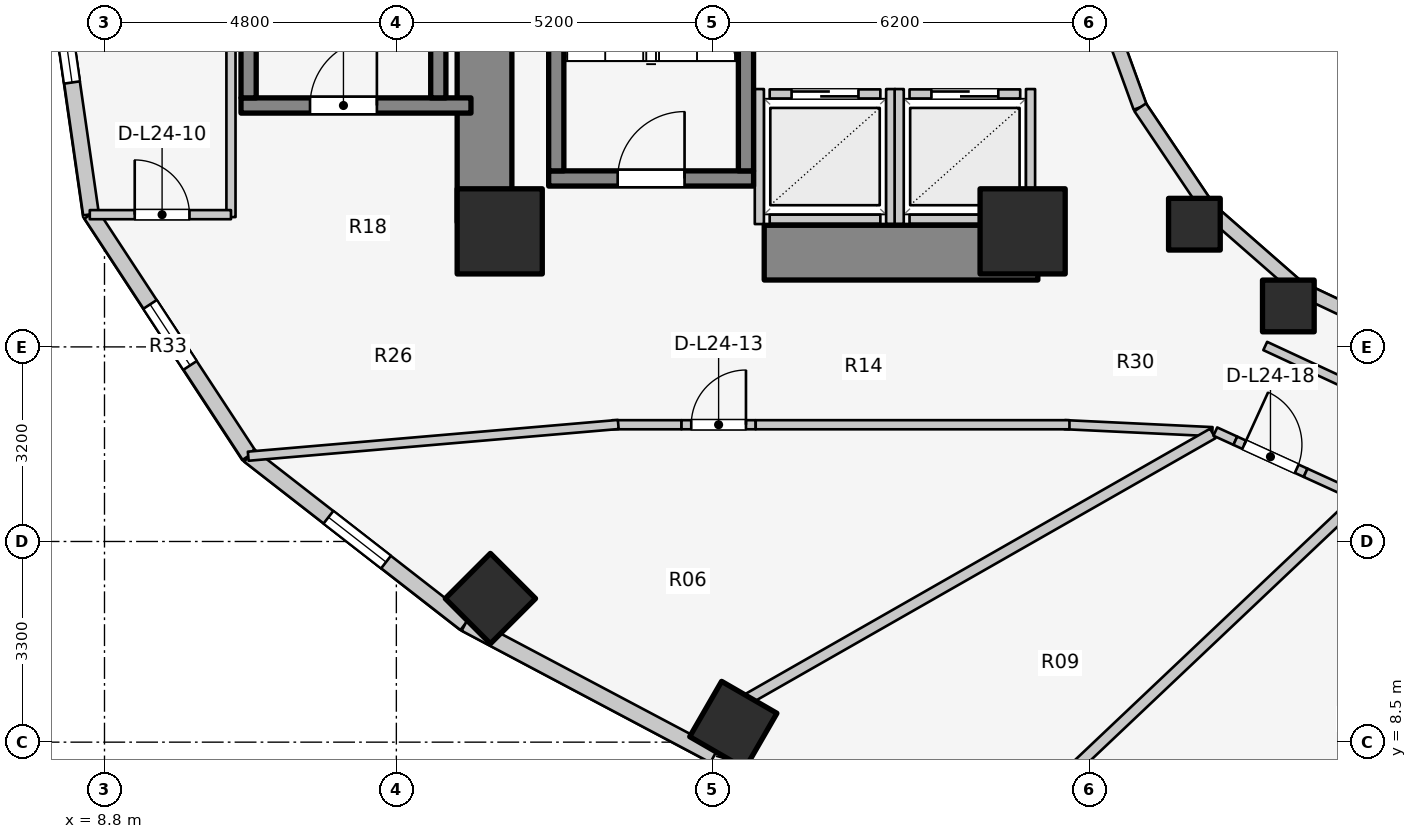
"""IFC4 building model, lengths in metres.
Left out: names, types, materials, properties, quantities, classifications, styles, units other than length and angle.
Written with IfcOpenShell. Run it as: python <this file> out.ifc"""

import sys

from ifc_helpers import new_model, si_unit, direction, frame, frame_2d, origin, origin_2d, place, context, subcontext, project, spatial, rectangle, extrude, element, fill, save


model = new_model("IFC4")
c1 = context("Model", 3, precision=1e-05, world=origin(), true_north=direction((0.0, 1.0)))
c2 = subcontext(c1, "Body", "Model", "MODEL_VIEW")
j1 = project(units=[si_unit("LENGTHUNIT", "METRE"), si_unit("PLANEANGLEUNIT", "RADIAN")], contexts=[c1])
p1 = place(None, origin())
s1 = spatial("IfcSite", under=j1, at=p1, CompositionType="ELEMENT")
p2 = place(p1, origin())
s2 = spatial("IfcBuilding", under=s1, at=p2, CompositionType="ELEMENT")
p3 = place(p2, frame((0.0, 0.0, 82.5)))
s3 = spatial("IfcBuildingStorey", under=s2, at=p3, CompositionType="ELEMENT", Elevation=82.5)
p4 = place(p3, frame((15.05, 17.05, 0.0), z_axis=(0.0, 0.0, 1.0), x_axis=(0.0, 1.0, 0.0)))
e1 = element("IfcWall", 1, at=p4, inside=s3, PredefinedType="SHEAR", context=c2, shape_type="SweptSolid", body=[
    extrude(rectangle(XDim=12.8, YDim=0.9, at=frame_2d((6.4, 0.0))), origin(), (0.0, 0.0, 1.0), 3.1),
])
p5 = place(p3, frame((19.65, 16.55, 0.0), z_axis=(0.0, 0.0, 1.0), x_axis=(1.0, 0.0, 0.0)))
e2 = element("IfcWall", 2, at=p5, inside=s3, PredefinedType="SHEAR", context=c2, shape_type="SweptSolid", body=[
    extrude(rectangle(XDim=4.5, YDim=0.9, at=frame_2d((2.25, 0.0))), origin(), (0.0, 0.0, 1.0), 3.1),
])
p6 = place(p3, frame((16.105, 17.77, 0.0), z_axis=(0.0, 0.0, 1.0), x_axis=(1.0, 0.0, 0.0)))
e3 = element("IfcWall", 3, at=p6, inside=s3, PredefinedType="SOLIDWALL", context=c2, shape_type="SweptSolid", body=[
    extrude(rectangle(XDim=3.37, YDim=0.25, at=frame_2d((1.685, 0.0))), origin(), (0.0, 0.0, 1.0), 3.1),
])
p7 = place(p6, frame((1.135, 0.0, 0.0)))
e4 = element("IfcOpeningElement", 4, at=p7, cuts=e3, PredefinedType="OPENING", context=c2, shape_type="SweptSolid", body=[
    extrude(rectangle(XDim=1.1, YDim=2.1, at=frame_2d((0.55, 1.05))), frame((0.0, 0.135, 0.0), z_axis=(0.0, -1.0, 0.0), x_axis=(1.0, 0.0, 0.0)), (0.0, 0.0, 1.0), 0.27),
])
for number, where, z_axis, x_axis in (
    (5, (16.23, 17.895, 0.0), (0.0, 0.0, 1.0), (0.0, 1.0, 0.0)),
    (6, (19.35, 17.895, 0.0), (0.0, 0.0, 1.0), (0.0, 1.0, 0.0)),
):
    element("IfcWall", number, at=place(p3, frame(where, z_axis=z_axis, x_axis=x_axis)), inside=s3, PredefinedType="SOLIDWALL", context=c2, shape_type="SweptSolid", body=[
        extrude(rectangle(XDim=7.81, YDim=0.25, at=frame_2d((3.905, 0.0))), origin(), (0.0, 0.0, 1.0), 3.1),
    ])
p8 = place(p3, frame((11.045, 18.97, 0.0), z_axis=(0.0, 0.0, 1.0), x_axis=(1.0, 0.0, 0.0)))
e7 = element("IfcWall", 7, at=p8, inside=s3, PredefinedType="SOLIDWALL", context=c2, shape_type="SweptSolid", body=[
    extrude(rectangle(XDim=3.782, YDim=0.25, at=frame_2d((1.891, 0.0))), origin(), (0.0, 0.0, 1.0), 3.1),
])
p9 = place(p8, frame((1.135, 0.0, 0.0)))
e8 = element("IfcOpeningElement", 8, at=p9, cuts=e7, PredefinedType="OPENING", context=c2, shape_type="SweptSolid", body=[
    extrude(rectangle(XDim=1.1, YDim=2.1, at=frame_2d((0.55, 1.05))), frame((0.0, 0.135, 0.0), z_axis=(0.0, -1.0, 0.0), x_axis=(1.0, 0.0, 0.0)), (0.0, 0.0, 1.0), 0.27),
])
for number, where, z_axis, x_axis in (
    (9, (11.17, 19.095, 0.0), (0.0, 0.0, 1.0), (0.0, 1.0, 0.0)),
    (10, (14.29, 19.095, 0.0), (0.0, 0.0, 1.0), (0.0, 1.0, 0.0)),
):
    element("IfcWall", number, at=place(p3, frame(where, z_axis=z_axis, x_axis=x_axis)), inside=s3, PredefinedType="SOLIDWALL", context=c2, shape_type="SweptSolid", body=[
        extrude(rectangle(XDim=7.81, YDim=0.25, at=frame_2d((3.905, 0.0))), origin(), (0.0, 0.0, 1.0), 3.1),
    ])
for number, where, z_axis, x_axis in (
    (11, (15.3, 16.9, 0.0), (0.0, 0.0, 1.0), (1.0, 0.0, 0.0)),
    (12, (23.9, 16.9, 0.0), (0.0, 0.0, 1.0), (1.0, 0.0, 0.0)),
):
    element("IfcColumn", number, at=place(p3, frame(where, z_axis=z_axis, x_axis=x_axis)), inside=s3, PredefinedType="COLUMN", context=c2, shape_type="SweptSolid", body=[
        extrude(rectangle(XDim=1.4, YDim=1.4, at=origin_2d()), origin(), (0.0, 0.0, 1.0), 3.1),
    ])
p10 = place(p3, frame((26.725, 17.018, 0.0), z_axis=(0.0, 0.0, 1.0), x_axis=(1.0, 0.0, 0.0)))
e13 = element("IfcColumn", 13, at=p10, inside=s3, PredefinedType="COLUMN", context=c2, shape_type="SweptSolid", body=[
    extrude(rectangle(XDim=0.85, YDim=0.85, at=origin_2d()), origin(), (0.0, 0.0, 1.0), 3.1),
])
p11 = place(p3, frame((15.147, 10.862, 0.0), z_axis=(0.0, 0.0, 1.0), x_axis=(-0.707106781187, -0.707106781187, 0.0)))
e14 = element("IfcColumn", 14, at=p11, inside=s3, PredefinedType="COLUMN", context=c2, shape_type="SweptSolid", body=[
    extrude(rectangle(XDim=1.05, YDim=1.05, at=origin_2d()), origin(), (0.0, 0.0, 1.0), 3.1),
])
p12 = place(p3, frame((28.27, 15.673, 0.0), z_axis=(0.0, 0.0, 1.0), x_axis=(1.0, 0.0, 0.0)))
e15 = element("IfcColumn", 15, at=p12, inside=s3, PredefinedType="COLUMN", context=c2, shape_type="SweptSolid", body=[
    extrude(rectangle(XDim=0.85, YDim=0.85, at=origin_2d()), origin(), (0.0, 0.0, 1.0), 3.1),
])
p13 = place(p3, frame((19.142, 8.782, 0.0), z_axis=(0.0, 0.0, 1.0), x_axis=(-0.5, -0.866025403784, 0.0)))
e16 = element("IfcColumn", 16, at=p13, inside=s3, PredefinedType="COLUMN", context=c2, shape_type="SweptSolid", body=[
    extrude(rectangle(XDim=1.05, YDim=1.05, at=origin_2d()), origin(), (0.0, 0.0, 1.0), 3.1),
])
p14 = place(p3, frame((25.123, 20.898, 0.0), z_axis=(0.0, 0.0, 1.0), x_axis=(0.341423187295, -0.93990968033, 0.0)))
e17 = element("IfcWall", 17, at=p14, inside=s3, PredefinedType="STANDARD", context=c2, shape_type="SweptSolid", body=[
    extrude(rectangle(XDim=2.084, YDim=0.23, at=frame_2d((1.042, 0.0))), origin(), (0.0, 0.0, 1.0), 2.56),
])
p15 = place(p3, frame((25.834, 18.94, 0.0), z_axis=(0.0, 0.0, 1.0), x_axis=(0.558197800898, -0.829707909492, 0.0)))
e18 = element("IfcWall", 18, at=p15, inside=s3, PredefinedType="STANDARD", context=c2, shape_type="SweptSolid", body=[
    extrude(rectangle(XDim=2.027, YDim=0.23, at=frame_2d((1.013, 0.0))), origin(), (0.0, 0.0, 1.0), 1.22),
])
p16 = place(p3, frame((26.965, 17.258, 0.0), z_axis=(0.0, 0.0, 1.0), x_axis=(0.752576694707, -0.658504607869, 0.0)))
e19 = element("IfcWall", 19, at=p16, inside=s3, PredefinedType="STANDARD", context=c2, shape_type="SweptSolid", body=[
    extrude(rectangle(XDim=1.959, YDim=0.23, at=frame_2d((0.98, 0.0))), origin(), (0.0, 0.0, 1.0), 1.22),
])
p17 = place(p3, frame((28.44, 15.968, 0.0), z_axis=(0.0, 0.0, 1.0), x_axis=(0.904179699603, -0.427152280606, 0.0)))
e20 = element("IfcWall", 20, at=p17, inside=s3, PredefinedType="STANDARD", context=c2, shape_type="SweptSolid", body=[
    extrude(rectangle(XDim=1.899, YDim=0.23, at=frame_2d((0.95, 0.0))), origin(), (0.0, 0.0, 1.0), 1.22),
])
p18 = place(p3, frame((7.74, 23.0, 0.0), z_axis=(0.0, 0.0, 1.0), x_axis=(0.142572472068, -0.98978436551, 0.0)))
e21 = element("IfcWall", 21, at=p18, inside=s3, PredefinedType="STANDARD", context=c2, shape_type="SweptSolid", body=[
    extrude(rectangle(XDim=5.879, YDim=0.26, at=frame_2d((2.939, 0.0))), origin(), (0.0, 0.0, 1.0), 2.57),
])
p19 = place(p18, frame((2.189, 0.0, 0.75)))
e22 = element("IfcOpeningElement", 22, at=p19, cuts=e21, PredefinedType="OPENING", context=c2, shape_type="SweptSolid", body=[
    extrude(rectangle(XDim=1.5, YDim=1.6, at=frame_2d((0.75, 0.8))), frame((0.0, 0.14, 0.0), z_axis=(0.0, -1.0, 0.0), x_axis=(1.0, 0.0, 0.0)), (0.0, 0.0, 1.0), 0.28),
])
p20 = place(p3, frame((8.578, 17.181, 0.0), z_axis=(0.0, 0.0, 1.0), x_axis=(0.548283220945, -0.836292717672, 0.0)))
e23 = element("IfcWall", 23, at=p20, inside=s3, PredefinedType="STANDARD", context=c2, shape_type="SweptSolid", body=[
    extrude(rectangle(XDim=4.744, YDim=0.26, at=frame_2d((2.372, 0.0))), origin(), (0.0, 0.0, 1.0), 1.22),
])
p21 = place(p20, frame((1.772, 0.0, 0.15)))
e24 = element("IfcOpeningElement", 24, at=p21, cuts=e23, PredefinedType="OPENING", context=c2, shape_type="SweptSolid", body=[
    extrude(rectangle(XDim=1.2, YDim=0.9, at=frame_2d((0.6, 0.45))), frame((0.0, 0.14, 0.0), z_axis=(0.0, -1.0, 0.0), x_axis=(1.0, 0.0, 0.0)), (0.0, 0.0, 1.0), 0.28),
])
p22 = place(p3, frame((11.179, 13.214, 0.0), z_axis=(0.0, 0.0, 1.0), x_axis=(0.789127449954, -0.614229491094, 0.0)))
e25 = element("IfcWall", 25, at=p22, inside=s3, PredefinedType="STANDARD", context=c2, shape_type="SweptSolid", body=[
    extrude(rectangle(XDim=4.505, YDim=0.26, at=frame_2d((2.252, 0.0))), origin(), (0.0, 0.0, 1.0), 1.22),
])
p23 = place(p22, frame((1.652, 0.0, 0.15)))
e26 = element("IfcOpeningElement", 26, at=p23, cuts=e25, PredefinedType="OPENING", context=c2, shape_type="SweptSolid", body=[
    extrude(rectangle(XDim=1.2, YDim=0.9, at=frame_2d((0.6, 0.45))), frame((0.0, 0.14, 0.0), z_axis=(0.0, -1.0, 0.0), x_axis=(1.0, 0.0, 0.0)), (0.0, 0.0, 1.0), 0.28),
])
p24 = place(p3, frame((14.734, 10.447, 0.0), z_axis=(0.0, 0.0, 1.0), x_axis=(0.883668636807, -0.4681129568, 0.0)))
e27 = element("IfcWall", 27, at=p24, inside=s3, PredefinedType="STANDARD", context=c2, shape_type="SweptSolid", body=[
    extrude(rectangle(XDim=4.631, YDim=0.26, at=frame_2d((2.316, 0.0))), origin(), (0.0, 0.0, 1.0), 1.22),
])
p25 = place(p3, frame((19.74, 19.16, 0.0), z_axis=(0.0, 0.0, 1.0), x_axis=(1.0, 0.0, 0.0)))
e28 = element("IfcWall", 28, at=p25, inside=s3, PredefinedType="SOLIDWALL", context=c2, shape_type="SweptSolid", body=[
    extrude(rectangle(XDim=1.82, YDim=0.15, at=frame_2d((0.91, 0.0))), origin(), (0.0, 0.0, 1.0), 2.575),
])
p26 = place(p25, frame((0.36, 0.0, 0.0)))
e29 = element("IfcOpeningElement", 29, at=p26, cuts=e28, PredefinedType="OPENING", context=c2, shape_type="SweptSolid", body=[
    extrude(rectangle(XDim=1.1, YDim=2.1, at=frame_2d((0.55, 1.05))), frame((0.0, 0.085, 0.0), z_axis=(0.0, -1.0, 0.0), x_axis=(1.0, 0.0, 0.0)), (0.0, 0.0, 1.0), 0.17),
])
p27 = place(p3, frame((19.74, 17.1, 0.0), z_axis=(0.0, 0.0, 1.0), x_axis=(1.0, 0.0, 0.0)))
e30 = element("IfcWall", 30, at=p27, inside=s3, PredefinedType="SOLIDWALL", context=c2, shape_type="SweptSolid", body=[
    extrude(rectangle(XDim=1.82, YDim=0.15, at=frame_2d((0.91, 0.0))), origin(), (0.0, 0.0, 1.0), 2.575),
])
p28 = place(p3, frame((19.57, 17.02, 0.0), z_axis=(0.0, 0.0, 1.0), x_axis=(0.0, 1.0, 0.0)))
e31 = element("IfcWall", 31, at=p28, inside=s3, PredefinedType="SOLIDWALL", context=c2, shape_type="SweptSolid", body=[
    extrude(rectangle(XDim=2.22, YDim=0.15, at=frame_2d((1.11, 0.0))), origin(), (0.0, 0.0, 1.0), 2.12),
])
p29 = place(p3, frame((21.73, 17.02, 0.0), z_axis=(0.0, 0.0, 1.0), x_axis=(0.0, 1.0, 0.0)))
e32 = element("IfcWall", 32, at=p29, inside=s3, PredefinedType="SOLIDWALL", context=c2, shape_type="SweptSolid", body=[
    extrude(rectangle(XDim=2.22, YDim=0.15, at=frame_2d((1.11, 0.0))), origin(), (0.0, 0.0, 1.0), 2.575),
])
p30 = place(p3, frame((22.04, 19.16, 0.0), z_axis=(0.0, 0.0, 1.0), x_axis=(1.0, 0.0, 0.0)))
e33 = element("IfcWall", 33, at=p30, inside=s3, PredefinedType="SOLIDWALL", context=c2, shape_type="SweptSolid", body=[
    extrude(rectangle(XDim=1.82, YDim=0.15, at=frame_2d((0.91, 0.0))), origin(), (0.0, 0.0, 1.0), 2.12),
])
p31 = place(p30, frame((0.36, 0.0, 0.0)))
e34 = element("IfcOpeningElement", 34, at=p31, cuts=e33, PredefinedType="OPENING", context=c2, shape_type="SweptSolid", body=[
    extrude(rectangle(XDim=1.1, YDim=2.1, at=frame_2d((0.55, 1.05))), frame((0.0, 0.085, 0.0), z_axis=(0.0, -1.0, 0.0), x_axis=(1.0, 0.0, 0.0)), (0.0, 0.0, 1.0), 0.17),
])
p32 = place(p3, frame((22.04, 17.1, 0.0), z_axis=(0.0, 0.0, 1.0), x_axis=(1.0, 0.0, 0.0)))
e35 = element("IfcWall", 35, at=p32, inside=s3, PredefinedType="SOLIDWALL", context=c2, shape_type="SweptSolid", body=[
    extrude(rectangle(XDim=1.82, YDim=0.15, at=frame_2d((0.91, 0.0))), origin(), (0.0, 0.0, 1.0), 2.12),
])
p33 = place(p3, frame((21.87, 17.02, 0.0), z_axis=(0.0, 0.0, 1.0), x_axis=(0.0, 1.0, 0.0)))
e36 = element("IfcWall", 36, at=p33, inside=s3, PredefinedType="SOLIDWALL", context=c2, shape_type="SweptSolid", body=[
    extrude(rectangle(XDim=2.22, YDim=0.15, at=frame_2d((1.11, 0.0))), origin(), (0.0, 0.0, 1.0), 2.575),
])
p34 = place(p3, frame((24.03, 17.02, 0.0), z_axis=(0.0, 0.0, 1.0), x_axis=(0.0, 1.0, 0.0)))
e37 = element("IfcWall", 37, at=p34, inside=s3, PredefinedType="SOLIDWALL", context=c2, shape_type="SweptSolid", body=[
    extrude(rectangle(XDim=2.22, YDim=0.15, at=frame_2d((1.11, 0.0))), origin(), (0.0, 0.0, 1.0), 1.873),
])
p35 = place(p3, frame((27.89, 15.015, 0.0), z_axis=(0.0, 0.0, 1.0), x_axis=(0.906943449489, -0.421252393975, 0.0)))
e38 = element("IfcWall", 38, at=p35, inside=s3, PredefinedType="PARTITIONING", context=c2, shape_type="SweptSolid", body=[
    extrude(rectangle(XDim=2.186, YDim=0.15, at=frame_2d((1.093, 0.0))), origin(), (0.0, 0.0, 1.0), 1.992),
])
p36 = place(p3, frame((10.88, 17.135, 0.0), z_axis=(0.0, 0.0, 1.0), x_axis=(0.0, 1.0, 0.0)))
e39 = element("IfcWall", 39, at=p36, inside=s3, PredefinedType="PARTITIONING", context=c2, shape_type="SweptSolid", body=[
    extrude(rectangle(XDim=11.73, YDim=0.15, at=frame_2d((5.865, 0.0))), origin(), (0.0, 0.0, 1.0), 2.12),
])
p37 = place(p3, frame((8.558, 17.175, 0.0), z_axis=(0.0, 0.0, 1.0), x_axis=(1.0, 0.0, 0.0)))
e40 = element("IfcWall", 40, at=p37, inside=s3, PredefinedType="PARTITIONING", context=c2, shape_type="SweptSolid", body=[
    extrude(rectangle(XDim=2.322, YDim=0.15, at=frame_2d((1.161, 0.0))), origin(), (0.0, 0.0, 1.0), 2.575),
])
p38 = place(p37, frame((0.739, 0.0, 0.0)))
e41 = element("IfcOpeningElement", 41, at=p38, cuts=e40, PredefinedType="OPENING", context=c2, shape_type="SweptSolid", body=[
    extrude(rectangle(XDim=0.9, YDim=2.1, at=frame_2d((0.45, 1.05))), frame((0.0, 0.085, 0.0), z_axis=(0.0, -1.0, 0.0), x_axis=(1.0, 0.0, 0.0)), (0.0, 0.0, 1.0), 0.17),
])
p39 = place(p3, frame((27.02, 13.606, 0.0), z_axis=(0.0, 0.0, 1.0), x_axis=(-0.998877427952, 0.047369651964, 0.0)))
e42 = element("IfcWall", 42, at=p39, inside=s3, PredefinedType="PARTITIONING", context=c2, shape_type="SweptSolid", body=[
    extrude(rectangle(XDim=2.433, YDim=0.15, at=frame_2d((1.216, 0.0))), origin(), (0.0, 0.0, 1.0), 1.992),
])
p40 = place(p3, frame((17.15, 13.72, 0.0), z_axis=(0.0, 0.0, 1.0), x_axis=(1.0, 0.0, 0.0)))
e43 = element("IfcWall", 43, at=p40, inside=s3, PredefinedType="PARTITIONING", context=c2, shape_type="SweptSolid", body=[
    extrude(rectangle(XDim=1.14, YDim=0.15, at=frame_2d((0.57, 0.0))), origin(), (0.0, 0.0, 1.0), 2.575),
])
p41 = place(p3, frame((18.29, 13.72, 0.0), z_axis=(0.0, 0.0, 1.0), x_axis=(1.0, 0.0, 0.0)))
e44 = element("IfcWall", 44, at=p41, inside=s3, PredefinedType="PARTITIONING", context=c2, shape_type="SweptSolid", body=[
    extrude(rectangle(XDim=1.22, YDim=0.15, at=frame_2d((0.61, 0.0))), origin(), (0.0, 0.0, 1.0), 2.575),
])
p42 = place(p41, frame((0.16, 0.0, 0.0)))
e45 = element("IfcOpeningElement", 45, at=p42, cuts=e44, PredefinedType="OPENING", context=c2, shape_type="SweptSolid", body=[
    extrude(rectangle(XDim=0.9, YDim=2.1, at=frame_2d((0.45, 1.05))), frame((0.0, 0.085, 0.0), z_axis=(0.0, -1.0, 0.0), x_axis=(1.0, 0.0, 0.0)), (0.0, 0.0, 1.0), 0.17),
])
p43 = place(p3, frame((19.51, 13.72, 0.0), z_axis=(0.0, 0.0, 1.0), x_axis=(1.0, 0.0, 0.0)))
e46 = element("IfcWall", 46, at=p43, inside=s3, PredefinedType="PARTITIONING", context=c2, shape_type="SweptSolid", body=[
    extrude(rectangle(XDim=5.16, YDim=0.15, at=frame_2d((2.58, 0.0))), origin(), (0.0, 0.0, 1.0), 1.992),
])
p44 = place(p3, frame((17.25, 13.724, 0.0), z_axis=(0.0, 0.0, 1.0), x_axis=(-0.996341886029, -0.085456691633, 0.0)))
e47 = element("IfcWall", 47, at=p44, inside=s3, PredefinedType="PARTITIONING", context=c2, shape_type="SweptSolid", body=[
    extrude(rectangle(XDim=6.108, YDim=0.15, at=frame_2d((3.054, 0.0))), origin(), (0.0, 0.0, 1.0), 1.22),
])
p45 = place(p3, frame((27.027, 13.576, 0.0), z_axis=(0.0, 0.0, 1.0), x_axis=(-0.868484076301, -0.495717065685, 0.0)))
e48 = element("IfcWall", 48, at=p45, inside=s3, PredefinedType="PARTITIONING", context=c2, shape_type="SweptSolid", body=[
    extrude(rectangle(XDim=8.789, YDim=0.18, at=frame_2d((4.394, 0.0))), origin(), (0.0, 0.0, 1.0), 1.22),
])
p46 = place(p3, frame((29.411, 12.482, 0.0), z_axis=(0.0, 0.0, 1.0), x_axis=(-0.726306601605, -0.687370875485, 0.0)))
e49 = element("IfcWall", 49, at=p46, inside=s3, PredefinedType="PARTITIONING", context=c2, shape_type="SweptSolid", body=[
    extrude(rectangle(XDim=6.76, YDim=0.18, at=frame_2d((3.38, 0.0))), origin(), (0.0, 0.0, 1.0), 1.22),
])
p47 = place(p3, frame((27.069, 13.607, 0.0), z_axis=(0.0, 0.0, 1.0), x_axis=(0.909787750204, -0.415073788113, 0.0)))
e50 = element("IfcWall", 50, at=p47, inside=s3, PredefinedType="PARTITIONING", context=c2, shape_type="SweptSolid", body=[
    extrude(rectangle(XDim=0.362, YDim=0.15, at=frame_2d((0.181, 0.0))), origin(), (0.0, 0.0, 1.0), 2.575),
])
p48 = place(p3, frame((27.398, 13.457, 0.0), z_axis=(0.0, 0.0, 1.0), x_axis=(0.909740090182, -0.415178236804, 0.0)))
e51 = element("IfcWall", 51, at=p48, inside=s3, PredefinedType="PARTITIONING", context=c2, shape_type="SweptSolid", body=[
    extrude(rectangle(XDim=1.27, YDim=0.15, at=frame_2d((0.635, 0.0))), origin(), (0.0, 0.0, 1.0), 2.16),
])
p49 = place(p48, frame((0.16, 0.0, 0.0)))
e52 = element("IfcOpeningElement", 52, at=p49, cuts=e51, PredefinedType="OPENING", context=c2, shape_type="SweptSolid", body=[
    extrude(rectangle(XDim=0.95, YDim=2.1, at=frame_2d((0.475, 1.05))), frame((0.0, 0.085, 0.0), z_axis=(0.0, -1.0, 0.0), x_axis=(1.0, 0.0, 0.0)), (0.0, 0.0, 1.0), 0.17),
])
p50 = place(p3, frame((28.554, 12.93, 0.0), z_axis=(0.0, 0.0, 1.0), x_axis=(0.909742502959, -0.415172949878, 0.0)))
e53 = element("IfcWall", 53, at=p50, inside=s3, PredefinedType="PARTITIONING", context=c2, shape_type="SweptSolid", body=[
    extrude(rectangle(XDim=0.993, YDim=0.15, at=frame_2d((0.497, 0.0))), origin(), (0.0, 0.0, 1.0), 1.992),
])
p51 = place(p19, origin())
e54 = element("IfcWindow", 54, at=p51, inside=s3, PartitioningType="SINGLE_PANEL", PredefinedType="WINDOW", context=c2, shape_type="SweptSolid", body=[
    extrude(rectangle(XDim=1.5, YDim=1.6, at=frame_2d((0.75, 0.8))), frame((0.0, 0.03, 0.0), z_axis=(0.0, -1.0, 0.0), x_axis=(1.0, 0.0, 0.0)), (0.0, 0.0, 1.0), 0.06),
])
fill(e22, e54)
p52 = place(p21, origin())
e55 = element("IfcWindow", 55, at=p52, inside=s3, PartitioningType="SINGLE_PANEL", PredefinedType="WINDOW", context=c2, shape_type="SweptSolid", body=[
    extrude(rectangle(XDim=1.2, YDim=0.9, at=frame_2d((0.6, 0.45))), frame((0.0, 0.03, 0.0), z_axis=(0.0, -1.0, 0.0), x_axis=(1.0, 0.0, 0.0)), (0.0, 0.0, 1.0), 0.06),
])
fill(e24, e55)
p53 = place(p23, origin())
e56 = element("IfcWindow", 56, at=p53, inside=s3, PartitioningType="SINGLE_PANEL", PredefinedType="WINDOW", context=c2, shape_type="SweptSolid", body=[
    extrude(rectangle(XDim=1.2, YDim=0.9, at=frame_2d((0.6, 0.45))), frame((0.0, 0.03, 0.0), z_axis=(0.0, -1.0, 0.0), x_axis=(1.0, 0.0, 0.0)), (0.0, 0.0, 1.0), 0.06),
])
fill(e26, e56)
p54 = place(p7, origin())
e57 = element("IfcDoor", 57, at=p54, inside=s3, OperationType="SINGLE_SWING_RIGHT", PredefinedType="DOOR", context=c2, shape_type="SweptSolid", body=[
    extrude(rectangle(XDim=1.1, YDim=2.1, at=frame_2d((0.55, 1.05))), frame((0.0, 0.025, 0.0), z_axis=(0.0, -1.0, 0.0), x_axis=(1.0, 0.0, 0.0)), (0.0, 0.0, 1.0), 0.05),
])
fill(e4, e57)
p55 = place(p9, origin())
e58 = element("IfcDoor", 58, at=p55, inside=s3, OperationType="SINGLE_SWING_RIGHT", PredefinedType="DOOR", context=c2, shape_type="SweptSolid", body=[
    extrude(rectangle(XDim=1.1, YDim=2.1, at=frame_2d((0.55, 1.05))), frame((0.0, 0.025, 0.0), z_axis=(0.0, -1.0, 0.0), x_axis=(1.0, 0.0, 0.0)), (0.0, 0.0, 1.0), 0.05),
])
fill(e8, e58)
p56 = place(p26, origin())
e59 = element("IfcDoor", 59, at=p56, inside=s3, OperationType="DOUBLE_DOOR_SLIDING", PredefinedType="DOOR", context=c2, shape_type="SweptSolid", body=[
    extrude(rectangle(XDim=1.1, YDim=2.1, at=frame_2d((0.55, 1.05))), frame((0.0, 0.025, 0.0), z_axis=(0.0, -1.0, 0.0), x_axis=(1.0, 0.0, 0.0)), (0.0, 0.0, 1.0), 0.05),
])
fill(e29, e59)
p57 = place(p31, origin())
e60 = element("IfcDoor", 60, at=p57, inside=s3, OperationType="DOUBLE_DOOR_SLIDING", PredefinedType="DOOR", context=c2, shape_type="SweptSolid", body=[
    extrude(rectangle(XDim=1.1, YDim=2.1, at=frame_2d((0.55, 1.05))), frame((0.0, 0.025, 0.0), z_axis=(0.0, -1.0, 0.0), x_axis=(1.0, 0.0, 0.0)), (0.0, 0.0, 1.0), 0.05),
])
fill(e34, e60)
p58 = place(p38, origin())
e61 = element("IfcDoor", 61, at=p58, inside=s3, OperationType="SINGLE_SWING_LEFT", PredefinedType="DOOR", context=c2, shape_type="SweptSolid", body=[
    extrude(rectangle(XDim=0.9, YDim=2.1, at=frame_2d((0.45, 1.05))), frame((0.0, 0.025, 0.0), z_axis=(0.0, -1.0, 0.0), x_axis=(1.0, 0.0, 0.0)), (0.0, 0.0, 1.0), 0.05),
])
fill(e41, e61)
p59 = place(p42, origin())
e62 = element("IfcDoor", 62, at=p59, inside=s3, OperationType="SINGLE_SWING_RIGHT", PredefinedType="DOOR", context=c2, shape_type="SweptSolid", body=[
    extrude(rectangle(XDim=0.9, YDim=2.1, at=frame_2d((0.45, 1.05))), frame((0.0, 0.025, 0.0), z_axis=(0.0, -1.0, 0.0), x_axis=(1.0, 0.0, 0.0)), (0.0, 0.0, 1.0), 0.05),
])
fill(e45, e62)
p60 = place(p49, origin())
e63 = element("IfcDoor", 63, at=p60, inside=s3, OperationType="SINGLE_SWING_LEFT", PredefinedType="DOOR", context=c2, shape_type="SweptSolid", body=[
    extrude(rectangle(XDim=0.95, YDim=2.1, at=frame_2d((0.475, 1.05))), frame((0.0, 0.025, 0.0), z_axis=(0.0, -1.0, 0.0), x_axis=(1.0, 0.0, 0.0)), (0.0, 0.0, 1.0), 0.05),
])
fill(e52, e63)
save(model, sys.argv[1])
